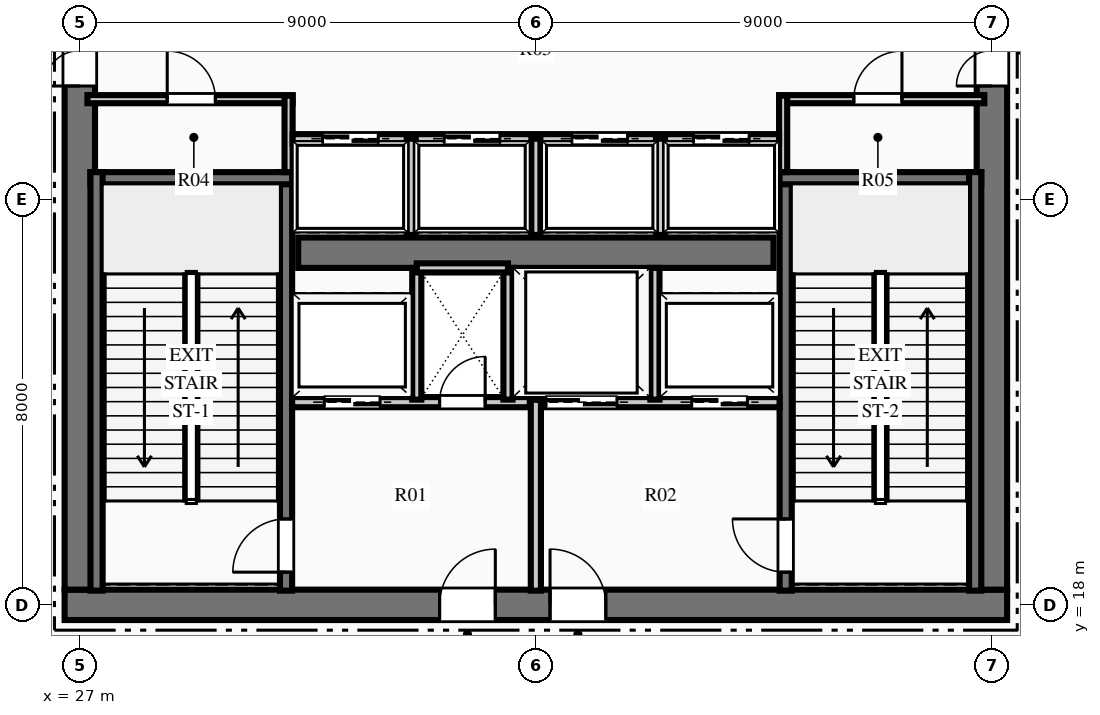
"""IFC4 building model, lengths in metres.
Left out: names, types, materials, properties, quantities, classifications, styles, units other than length and angle.
Written with IfcOpenShell. Run it as: python <this file> out.ifc"""

import sys

from ifc_helpers import new_model, si_unit, direction, frame, frame_2d, origin, place, context, subcontext, project, spatial, rectangle, extrude, element, fill, save


model = new_model("IFC4")
c1 = context("Model", 3, precision=1e-05, world=origin(), true_north=direction((0.0, 1.0)))
c2 = subcontext(c1, "Body", "Model", "MODEL_VIEW")
j1 = project(units=[si_unit("LENGTHUNIT", "METRE"), si_unit("PLANEANGLEUNIT", "RADIAN")], contexts=[c1])
p1 = place(None, origin())
s1 = spatial("IfcSite", under=j1, at=p1, CompositionType="ELEMENT")
p2 = place(p1, origin())
s2 = spatial("IfcBuilding", under=s1, at=p2, CompositionType="ELEMENT")
p3 = place(p2, frame((0.0, 0.0, 22.2)))
s3 = spatial("IfcBuildingStorey", under=s2, at=p3, CompositionType="ELEMENT", Elevation=22.2)
p4 = place(p3, frame((26.7, 18.0, 0.0), z_axis=(0.0, 0.0, 1.0), x_axis=(1.0, 0.0, 0.0)))
e1 = element("IfcWall", 1, at=p4, inside=s3, PredefinedType="SHEAR", context=c2, shape_type="SweptSolid", body=[
    extrude(rectangle(XDim=18.6, YDim=0.6, at=frame_2d((9.3, 0.0))), origin(), (0.0, 0.0, 1.0), 6.0),
])
p5 = place(p4, frame((7.4, 0.0, 0.0)))
e2 = element("IfcOpeningElement", 2, at=p5, cuts=e1, PredefinedType="OPENING", context=c2, shape_type="SweptSolid", body=[
    extrude(rectangle(XDim=1.1, YDim=2.15, at=frame_2d((0.55, 1.075))), frame((0.0, 0.31, 0.0), z_axis=(0.0, -1.0, 0.0), x_axis=(1.0, 0.0, 0.0)), (0.0, 0.0, 1.0), 0.62),
])
p6 = place(p4, frame((9.58, 0.0, 0.0)))
e3 = element("IfcOpeningElement", 3, at=p6, cuts=e1, PredefinedType="OPENING", context=c2, shape_type="SweptSolid", body=[
    extrude(rectangle(XDim=1.1, YDim=2.15, at=frame_2d((0.55, 1.075))), frame((0.0, 0.31, 0.0), z_axis=(0.0, -1.0, 0.0), x_axis=(1.0, 0.0, 0.0)), (0.0, 0.0, 1.0), 0.62),
])
p7 = place(p3, frame((27.0, 18.3, 0.0), z_axis=(0.0, 0.0, 1.0), x_axis=(0.0, 1.0, 0.0)))
e4 = element("IfcWall", 4, at=p7, inside=s3, PredefinedType="SHEAR", context=c2, shape_type="SweptSolid", body=[
    extrude(rectangle(XDim=15.4, YDim=0.6, at=frame_2d((7.7, 0.0))), origin(), (0.0, 0.0, 1.0), 6.0),
])
p8 = place(p7, frame((9.94, 0.0, 0.0)))
e5 = element("IfcOpeningElement", 5, at=p8, cuts=e4, PredefinedType="OPENING", context=c2, shape_type="SweptSolid", body=[
    extrude(rectangle(XDim=1.4, YDim=2.2, at=frame_2d((0.7, 1.1))), frame((0.0, 0.31, 0.0), z_axis=(0.0, -1.0, 0.0), x_axis=(1.0, 0.0, 0.0)), (0.0, 0.0, 1.0), 0.62),
])
p9 = place(p3, frame((45.0, 18.3, 0.0), z_axis=(0.0, 0.0, 1.0), x_axis=(0.0, 1.0, 0.0)))
e6 = element("IfcWall", 6, at=p9, inside=s3, PredefinedType="SHEAR", context=c2, shape_type="SweptSolid", body=[
    extrude(rectangle(XDim=15.4, YDim=0.6, at=frame_2d((7.7, 0.0))), origin(), (0.0, 0.0, 1.0), 6.0),
])
p10 = place(p9, frame((9.94, 0.0, 0.0)))
e7 = element("IfcOpeningElement", 7, at=p10, cuts=e6, PredefinedType="OPENING", context=c2, shape_type="SweptSolid", body=[
    extrude(rectangle(XDim=1.4, YDim=2.2, at=frame_2d((0.7, 1.1))), frame((0.0, 0.31, 0.0), z_axis=(0.0, -1.0, 0.0), x_axis=(1.0, 0.0, 0.0)), (0.0, 0.0, 1.0), 0.62),
])
p11 = place(p3, frame((31.31, 24.95, 0.0), z_axis=(0.0, 0.0, 1.0), x_axis=(1.0, 0.0, 0.0)))
e8 = element("IfcWall", 8, at=p11, inside=s3, PredefinedType="SHEAR", context=c2, shape_type="SweptSolid", body=[
    extrude(rectangle(XDim=9.38, YDim=0.6, at=frame_2d((4.69, 0.0))), origin(), (0.0, 0.0, 1.0), 6.0),
])
p12 = place(p3, frame((31.07, 18.28, 0.0), z_axis=(0.0, 0.0, 1.0), x_axis=(0.0, 1.0, 0.0)))
e9 = element("IfcWall", 9, at=p12, inside=s3, PredefinedType="SHEAR", context=c2, shape_type="SweptSolid", body=[
    extrude(rectangle(XDim=8.26, YDim=0.24, at=frame_2d((4.13, 0.0))), origin(), (0.0, 0.0, 1.0), 6.0),
])
p13 = place(p12, frame((0.365, 0.0, 0.0)))
e10 = element("IfcOpeningElement", 10, at=p13, cuts=e9, PredefinedType="OPENING", context=c2, shape_type="SweptSolid", body=[
    extrude(rectangle(XDim=1.05, YDim=2.15, at=frame_2d((0.525, 1.075))), frame((0.0, 0.13, 0.0), z_axis=(0.0, -1.0, 0.0), x_axis=(1.0, 0.0, 0.0)), (0.0, 0.0, 1.0), 0.26),
])
p14 = place(p3, frame((27.21, 26.42, 0.0), z_axis=(0.0, 0.0, 1.0), x_axis=(1.0, 0.0, 0.0)))
e11 = element("IfcWall", 11, at=p14, inside=s3, PredefinedType="SHEAR", context=c2, shape_type="SweptSolid", body=[
    extrude(rectangle(XDim=3.98, YDim=0.24, at=frame_2d((1.99, 0.0))), origin(), (0.0, 0.0, 1.0), 6.0),
])
p15 = place(p3, frame((27.33, 18.28, 0.0), z_axis=(0.0, 0.0, 1.0), x_axis=(0.0, 1.0, 0.0)))
e12 = element("IfcWall", 12, at=p15, inside=s3, PredefinedType="SHEAR", context=c2, shape_type="SweptSolid", body=[
    extrude(rectangle(XDim=8.26, YDim=0.24, at=frame_2d((4.13, 0.0))), origin(), (0.0, 0.0, 1.0), 6.0),
])
p16 = place(p3, frame((40.93, 18.28, 0.0), z_axis=(0.0, 0.0, 1.0), x_axis=(0.0, 1.0, 0.0)))
e13 = element("IfcWall", 13, at=p16, inside=s3, PredefinedType="SHEAR", context=c2, shape_type="SweptSolid", body=[
    extrude(rectangle(XDim=8.26, YDim=0.24, at=frame_2d((4.13, 0.0))), origin(), (0.0, 0.0, 1.0), 6.0),
])
p17 = place(p16, frame((0.365, 0.0, 0.0)))
e14 = element("IfcOpeningElement", 14, at=p17, cuts=e13, PredefinedType="OPENING", context=c2, shape_type="SweptSolid", body=[
    extrude(rectangle(XDim=1.05, YDim=2.15, at=frame_2d((0.525, 1.075))), frame((0.0, 0.13, 0.0), z_axis=(0.0, -1.0, 0.0), x_axis=(1.0, 0.0, 0.0)), (0.0, 0.0, 1.0), 0.26),
])
p18 = place(p3, frame((40.81, 26.42, 0.0), z_axis=(0.0, 0.0, 1.0), x_axis=(1.0, 0.0, 0.0)))
e15 = element("IfcWall", 15, at=p18, inside=s3, PredefinedType="SHEAR", context=c2, shape_type="SweptSolid", body=[
    extrude(rectangle(XDim=3.98, YDim=0.24, at=frame_2d((1.99, 0.0))), origin(), (0.0, 0.0, 1.0), 6.0),
])
p19 = place(p3, frame((44.67, 18.28, 0.0), z_axis=(0.0, 0.0, 1.0), x_axis=(0.0, 1.0, 0.0)))
e16 = element("IfcWall", 16, at=p19, inside=s3, PredefinedType="SHEAR", context=c2, shape_type="SweptSolid", body=[
    extrude(rectangle(XDim=8.26, YDim=0.24, at=frame_2d((4.13, 0.0))), origin(), (0.0, 0.0, 1.0), 6.0),
])
p20 = place(p3, frame((36.0, 18.28, 0.0), z_axis=(0.0, 0.0, 1.0), x_axis=(0.0, 1.0, 0.0)))
e17 = element("IfcWall", 17, at=p20, inside=s3, PredefinedType="PARTITIONING", context=c2, shape_type="SweptSolid", body=[
    extrude(rectangle(XDim=3.77, YDim=0.2, at=frame_2d((1.885, 0.0))), origin(), (0.0, 0.0, 1.0), 5.59),
])
p21 = place(p3, frame((31.19, 22.0, 0.0), z_axis=(0.0, 0.0, 1.0), x_axis=(1.0, 0.0, 0.0)))
e18 = element("IfcWall", 18, at=p21, inside=s3, PredefinedType="PARTITIONING", context=c2, shape_type="SweptSolid", body=[
    extrude(rectangle(XDim=4.69, YDim=0.2, at=frame_2d((2.345, 0.0))), origin(), (0.0, 0.0, 1.0), 5.59),
])
p22 = place(p21, frame((2.91, 0.0, 0.0)))
e19 = element("IfcOpeningElement", 19, at=p22, cuts=e18, PredefinedType="OPENING", context=c2, shape_type="SweptSolid", body=[
    extrude(rectangle(XDim=0.9, YDim=2.15, at=frame_2d((0.45, 1.075))), frame((0.0, 0.11, 0.0), z_axis=(0.0, -1.0, 0.0), x_axis=(1.0, 0.0, 0.0)), (0.0, 0.0, 1.0), 0.22),
])
p23 = place(p21, frame((0.635, 0.0, 0.0)))
e20 = element("IfcOpeningElement", 20, at=p23, cuts=e18, PredefinedType="OPENING", context=c2, shape_type="SweptSolid", body=[
    extrude(rectangle(XDim=1.1, YDim=2.15, at=frame_2d((0.55, 1.075))), frame((0.0, 0.11, 0.0), z_axis=(0.0, -1.0, 0.0), x_axis=(1.0, 0.0, 0.0)), (0.0, 0.0, 1.0), 0.22),
])
p24 = place(p3, frame((36.12, 22.0, 0.0), z_axis=(0.0, 0.0, 1.0), x_axis=(1.0, 0.0, 0.0)))
e21 = element("IfcWall", 21, at=p24, inside=s3, PredefinedType="PARTITIONING", context=c2, shape_type="SweptSolid", body=[
    extrude(rectangle(XDim=4.69, YDim=0.2, at=frame_2d((2.345, 0.0))), origin(), (0.0, 0.0, 1.0), 5.59),
])
p25 = place(p24, frame((2.955, 0.0, 0.0)))
e22 = element("IfcOpeningElement", 22, at=p25, cuts=e21, PredefinedType="OPENING", context=c2, shape_type="SweptSolid", body=[
    extrude(rectangle(XDim=1.1, YDim=2.15, at=frame_2d((0.55, 1.075))), frame((0.0, 0.11, 0.0), z_axis=(0.0, -1.0, 0.0), x_axis=(1.0, 0.0, 0.0)), (0.0, 0.0, 1.0), 0.22),
])
p26 = place(p24, frame((0.08, 0.0, 0.0)))
e23 = element("IfcOpeningElement", 23, at=p26, cuts=e21, PredefinedType="OPENING", context=c2, shape_type="SweptSolid", body=[
    extrude(rectangle(XDim=1.4, YDim=2.2, at=frame_2d((0.7, 1.1))), frame((0.0, 0.11, 0.0), z_axis=(0.0, -1.0, 0.0), x_axis=(1.0, 0.0, 0.0)), (0.0, 0.0, 1.0), 0.22),
])
for number, where, z_axis, x_axis in (
    (24, (33.65, 22.05, 0.0), (0.0, 0.0, 1.0), (0.0, 1.0, 0.0)),
    (25, (35.45, 22.05, 0.0), (0.0, 0.0, 1.0), (0.0, 1.0, 0.0)),
):
    element("IfcWall", number, at=place(p3, frame(where, z_axis=z_axis, x_axis=x_axis)), inside=s3, PredefinedType="PARTITIONING", context=c2, shape_type="SweptSolid", body=[
        extrude(rectangle(XDim=2.6, YDim=0.18, at=frame_2d((1.3, 0.0))), origin(), (0.0, 0.0, 1.0), 5.59),
    ])
p27 = place(p3, frame((33.65, 24.65, 0.0), z_axis=(0.0, 0.0, 1.0), x_axis=(1.0, 0.0, 0.0)))
e26 = element("IfcWall", 26, at=p27, inside=s3, PredefinedType="PARTITIONING", context=c2, shape_type="SweptSolid", body=[
    extrude(rectangle(XDim=1.8, YDim=0.18, at=frame_2d((0.9, 0.0))), origin(), (0.0, 0.0, 1.0), 5.59),
])
p28 = place(p3, frame((38.35, 22.05, 0.0), z_axis=(0.0, 0.0, 1.0), x_axis=(0.0, 1.0, 0.0)))
e27 = element("IfcWall", 27, at=p28, inside=s3, PredefinedType="PARTITIONING", context=c2, shape_type="SweptSolid", body=[
    extrude(rectangle(XDim=2.6, YDim=0.18, at=frame_2d((1.3, 0.0))), origin(), (0.0, 0.0, 1.0), 5.59),
])
p29 = place(p3, frame((27.15, 27.98, 0.0), z_axis=(0.0, 0.0, 1.0), x_axis=(1.0, 0.0, 0.0)))
e28 = element("IfcWall", 28, at=p29, inside=s3, PredefinedType="PARTITIONING", context=c2, shape_type="SweptSolid", body=[
    extrude(rectangle(XDim=4.05, YDim=0.16, at=frame_2d((2.025, 0.0))), origin(), (0.0, 0.0, 1.0), 5.59),
])
p30 = place(p29, frame((1.575, 0.0, 0.0)))
e29 = element("IfcOpeningElement", 29, at=p30, cuts=e28, PredefinedType="OPENING", context=c2, shape_type="SweptSolid", body=[
    extrude(rectangle(XDim=0.95, YDim=2.15, at=frame_2d((0.475, 1.075))), frame((0.0, 0.09, 0.0), z_axis=(0.0, -1.0, 0.0), x_axis=(1.0, 0.0, 0.0)), (0.0, 0.0, 1.0), 0.18),
])
p31 = place(p3, frame((31.12, 26.54, 0.0), z_axis=(0.0, 0.0, 1.0), x_axis=(0.0, 1.0, 0.0)))
e30 = element("IfcWall", 30, at=p31, inside=s3, PredefinedType="PARTITIONING", context=c2, shape_type="SweptSolid", body=[
    extrude(rectangle(XDim=1.51, YDim=0.16, at=frame_2d((0.755, 0.0))), origin(), (0.0, 0.0, 1.0), 5.59),
])
p32 = place(p3, frame((40.8, 27.98, 0.0), z_axis=(0.0, 0.0, 1.0), x_axis=(1.0, 0.0, 0.0)))
e31 = element("IfcWall", 31, at=p32, inside=s3, PredefinedType="PARTITIONING", context=c2, shape_type="SweptSolid", body=[
    extrude(rectangle(XDim=4.05, YDim=0.16, at=frame_2d((2.025, 0.0))), origin(), (0.0, 0.0, 1.0), 5.59),
])
p33 = place(p32, frame((1.475, 0.0, 0.0)))
e32 = element("IfcOpeningElement", 32, at=p33, cuts=e31, PredefinedType="OPENING", context=c2, shape_type="SweptSolid", body=[
    extrude(rectangle(XDim=0.95, YDim=2.15, at=frame_2d((0.475, 1.075))), frame((0.0, 0.09, 0.0), z_axis=(0.0, -1.0, 0.0), x_axis=(1.0, 0.0, 0.0)), (0.0, 0.0, 1.0), 0.18),
])
p34 = place(p3, frame((40.88, 26.54, 0.0), z_axis=(0.0, 0.0, 1.0), x_axis=(0.0, 1.0, 0.0)))
e33 = element("IfcWall", 33, at=p34, inside=s3, PredefinedType="PARTITIONING", context=c2, shape_type="SweptSolid", body=[
    extrude(rectangle(XDim=1.51, YDim=0.16, at=frame_2d((0.755, 0.0))), origin(), (0.0, 0.0, 1.0), 5.59),
])
p35 = place(p3, frame((31.2, 27.2, 0.0), z_axis=(0.0, 0.0, 1.0), x_axis=(1.0, 0.0, 0.0)))
e34 = element("IfcWall", 34, at=p35, inside=s3, PredefinedType="PARTITIONING", context=c2, shape_type="SweptSolid", body=[
    extrude(rectangle(XDim=9.6, YDim=0.18, at=frame_2d((4.8, 0.0))), origin(), (0.0, 0.0, 1.0), 5.59),
])
p36 = place(p35, frame((0.59, 0.0, 0.0)))
e35 = element("IfcOpeningElement", 35, at=p36, cuts=e34, PredefinedType="OPENING", context=c2, shape_type="SweptSolid", body=[
    extrude(rectangle(XDim=1.1, YDim=2.15, at=frame_2d((0.55, 1.075))), frame((0.0, 0.1, 0.0), z_axis=(0.0, -1.0, 0.0), x_axis=(1.0, 0.0, 0.0)), (0.0, 0.0, 1.0), 0.2),
])
p37 = place(p35, frame((2.99, 0.0, 0.0)))
e36 = element("IfcOpeningElement", 36, at=p37, cuts=e34, PredefinedType="OPENING", context=c2, shape_type="SweptSolid", body=[
    extrude(rectangle(XDim=1.1, YDim=2.15, at=frame_2d((0.55, 1.075))), frame((0.0, 0.1, 0.0), z_axis=(0.0, -1.0, 0.0), x_axis=(1.0, 0.0, 0.0)), (0.0, 0.0, 1.0), 0.2),
])
p38 = place(p35, frame((5.51, 0.0, 0.0)))
e37 = element("IfcOpeningElement", 37, at=p38, cuts=e34, PredefinedType="OPENING", context=c2, shape_type="SweptSolid", body=[
    extrude(rectangle(XDim=1.1, YDim=2.15, at=frame_2d((0.55, 1.075))), frame((0.0, 0.1, 0.0), z_axis=(0.0, -1.0, 0.0), x_axis=(1.0, 0.0, 0.0)), (0.0, 0.0, 1.0), 0.2),
])
p39 = place(p35, frame((7.91, 0.0, 0.0)))
e38 = element("IfcOpeningElement", 38, at=p39, cuts=e34, PredefinedType="OPENING", context=c2, shape_type="SweptSolid", body=[
    extrude(rectangle(XDim=1.1, YDim=2.15, at=frame_2d((0.55, 1.075))), frame((0.0, 0.1, 0.0), z_axis=(0.0, -1.0, 0.0), x_axis=(1.0, 0.0, 0.0)), (0.0, 0.0, 1.0), 0.2),
])
for number, where, z_axis, x_axis in (
    (39, (33.54, 25.3, 0.0), (0.0, 0.0, 1.0), (0.0, 1.0, 0.0)),
    (40, (36.0, 25.3, 0.0), (0.0, 0.0, 1.0), (0.0, 1.0, 0.0)),
    (41, (38.46, 25.3, 0.0), (0.0, 0.0, 1.0), (0.0, 1.0, 0.0)),
):
    element("IfcWall", number, at=place(p3, frame(where, z_axis=z_axis, x_axis=x_axis)), inside=s3, PredefinedType="PARTITIONING", context=c2, shape_type="SweptSolid", body=[
        extrude(rectangle(XDim=1.9, YDim=0.18, at=frame_2d((0.95, 0.0))), origin(), (0.0, 0.0, 1.0), 5.59),
    ])
p40 = place(p30, origin())
e42 = element("IfcDoor", 42, at=p40, inside=s3, OperationType="SINGLE_SWING_LEFT", PredefinedType="DOOR", context=c2, shape_type="SweptSolid", body=[
    extrude(rectangle(XDim=0.95, YDim=2.15, at=frame_2d((0.475, 1.075))), frame((0.0, 0.025, 0.0), z_axis=(0.0, -1.0, 0.0), x_axis=(1.0, 0.0, 0.0)), (0.0, 0.0, 1.0), 0.05),
])
fill(e29, e42)
p41 = place(p33, origin())
e43 = element("IfcDoor", 43, at=p41, inside=s3, OperationType="SINGLE_SWING_RIGHT", PredefinedType="DOOR", context=c2, shape_type="SweptSolid", body=[
    extrude(rectangle(XDim=0.95, YDim=2.15, at=frame_2d((0.475, 1.075))), frame((0.0, 0.025, 0.0), z_axis=(0.0, -1.0, 0.0), x_axis=(1.0, 0.0, 0.0)), (0.0, 0.0, 1.0), 0.05),
])
fill(e32, e43)
p42 = place(p13, origin())
e44 = element("IfcDoor", 44, at=p42, inside=s3, OperationType="SINGLE_SWING_LEFT", PredefinedType="DOOR", context=c2, shape_type="SweptSolid", body=[
    extrude(rectangle(XDim=1.05, YDim=2.15, at=frame_2d((0.525, 1.075))), frame((0.0, 0.025, 0.0), z_axis=(0.0, -1.0, 0.0), x_axis=(1.0, 0.0, 0.0)), (0.0, 0.0, 1.0), 0.05),
])
fill(e10, e44)
p43 = place(p17, origin())
e45 = element("IfcDoor", 45, at=p43, inside=s3, OperationType="SINGLE_SWING_RIGHT", PredefinedType="DOOR", context=c2, shape_type="SweptSolid", body=[
    extrude(rectangle(XDim=1.05, YDim=2.15, at=frame_2d((0.525, 1.075))), frame((0.0, 0.025, 0.0), z_axis=(0.0, -1.0, 0.0), x_axis=(1.0, 0.0, 0.0)), (0.0, 0.0, 1.0), 0.05),
])
fill(e14, e45)
p44 = place(p5, origin())
e46 = element("IfcDoor", 46, at=p44, inside=s3, OperationType="SINGLE_SWING_RIGHT", PredefinedType="DOOR", context=c2, shape_type="SweptSolid", body=[
    extrude(rectangle(XDim=1.1, YDim=2.15, at=frame_2d((0.55, 1.075))), frame((0.0, 0.025, 0.0), z_axis=(0.0, -1.0, 0.0), x_axis=(1.0, 0.0, 0.0)), (0.0, 0.0, 1.0), 0.05),
])
fill(e2, e46)
p45 = place(p6, origin())
e47 = element("IfcDoor", 47, at=p45, inside=s3, OperationType="SINGLE_SWING_LEFT", PredefinedType="DOOR", context=c2, shape_type="SweptSolid", body=[
    extrude(rectangle(XDim=1.1, YDim=2.15, at=frame_2d((0.55, 1.075))), frame((0.0, 0.025, 0.0), z_axis=(0.0, -1.0, 0.0), x_axis=(1.0, 0.0, 0.0)), (0.0, 0.0, 1.0), 0.05),
])
fill(e3, e47)
p46 = place(p22, origin())
e48 = element("IfcDoor", 48, at=p46, inside=s3, OperationType="SINGLE_SWING_RIGHT", PredefinedType="DOOR", context=c2, shape_type="SweptSolid", body=[
    extrude(rectangle(XDim=0.9, YDim=2.15, at=frame_2d((0.45, 1.075))), frame((0.0, 0.025, 0.0), z_axis=(0.0, -1.0, 0.0), x_axis=(1.0, 0.0, 0.0)), (0.0, 0.0, 1.0), 0.05),
])
fill(e19, e48)
p47 = place(p8, origin())
e49 = element("IfcDoor", 49, at=p47, inside=s3, OperationType="DOUBLE_DOOR_SINGLE_SWING", PredefinedType="DOOR", context=c2, shape_type="SweptSolid", body=[
    extrude(rectangle(XDim=1.4, YDim=2.2, at=frame_2d((0.7, 1.1))), frame((0.0, 0.025, 0.0), z_axis=(0.0, -1.0, 0.0), x_axis=(1.0, 0.0, 0.0)), (0.0, 0.0, 1.0), 0.05),
])
fill(e5, e49)
p48 = place(p10, origin())
e50 = element("IfcDoor", 50, at=p48, inside=s3, OperationType="DOUBLE_DOOR_SINGLE_SWING", PredefinedType="DOOR", context=c2, shape_type="SweptSolid", body=[
    extrude(rectangle(XDim=1.4, YDim=2.2, at=frame_2d((0.7, 1.1))), frame((0.0, 0.025, 0.0), z_axis=(0.0, -1.0, 0.0), x_axis=(1.0, 0.0, 0.0)), (0.0, 0.0, 1.0), 0.05),
])
fill(e7, e50)
p49 = place(p36, origin())
e51 = element("IfcDoor", 51, at=p49, inside=s3, OperationType="SLIDING_TO_LEFT", PredefinedType="DOOR", context=c2, shape_type="SweptSolid", body=[
    extrude(rectangle(XDim=1.1, YDim=2.15, at=frame_2d((0.55, 1.075))), frame((0.0, 0.025, 0.0), z_axis=(0.0, -1.0, 0.0), x_axis=(1.0, 0.0, 0.0)), (0.0, 0.0, 1.0), 0.05),
])
fill(e35, e51)
p50 = place(p37, origin())
e52 = element("IfcDoor", 52, at=p50, inside=s3, OperationType="SLIDING_TO_LEFT", PredefinedType="DOOR", context=c2, shape_type="SweptSolid", body=[
    extrude(rectangle(XDim=1.1, YDim=2.15, at=frame_2d((0.55, 1.075))), frame((0.0, 0.025, 0.0), z_axis=(0.0, -1.0, 0.0), x_axis=(1.0, 0.0, 0.0)), (0.0, 0.0, 1.0), 0.05),
])
fill(e36, e52)
p51 = place(p38, origin())
e53 = element("IfcDoor", 53, at=p51, inside=s3, OperationType="SLIDING_TO_LEFT", PredefinedType="DOOR", context=c2, shape_type="SweptSolid", body=[
    extrude(rectangle(XDim=1.1, YDim=2.15, at=frame_2d((0.55, 1.075))), frame((0.0, 0.025, 0.0), z_axis=(0.0, -1.0, 0.0), x_axis=(1.0, 0.0, 0.0)), (0.0, 0.0, 1.0), 0.05),
])
fill(e37, e53)
p52 = place(p39, origin())
e54 = element("IfcDoor", 54, at=p52, inside=s3, OperationType="SLIDING_TO_LEFT", PredefinedType="DOOR", context=c2, shape_type="SweptSolid", body=[
    extrude(rectangle(XDim=1.1, YDim=2.15, at=frame_2d((0.55, 1.075))), frame((0.0, 0.025, 0.0), z_axis=(0.0, -1.0, 0.0), x_axis=(1.0, 0.0, 0.0)), (0.0, 0.0, 1.0), 0.05),
])
fill(e38, e54)
p53 = place(p23, origin())
e55 = element("IfcDoor", 55, at=p53, inside=s3, OperationType="SLIDING_TO_LEFT", PredefinedType="DOOR", context=c2, shape_type="SweptSolid", body=[
    extrude(rectangle(XDim=1.1, YDim=2.15, at=frame_2d((0.55, 1.075))), frame((0.0, 0.025, 0.0), z_axis=(0.0, -1.0, 0.0), x_axis=(1.0, 0.0, 0.0)), (0.0, 0.0, 1.0), 0.05),
])
fill(e20, e55)
p54 = place(p25, origin())
e56 = element("IfcDoor", 56, at=p54, inside=s3, OperationType="SLIDING_TO_LEFT", PredefinedType="DOOR", context=c2, shape_type="SweptSolid", body=[
    extrude(rectangle(XDim=1.1, YDim=2.15, at=frame_2d((0.55, 1.075))), frame((0.0, 0.025, 0.0), z_axis=(0.0, -1.0, 0.0), x_axis=(1.0, 0.0, 0.0)), (0.0, 0.0, 1.0), 0.05),
])
fill(e22, e56)
p55 = place(p26, origin())
e57 = element("IfcDoor", 57, at=p55, inside=s3, OperationType="SLIDING_TO_LEFT", PredefinedType="DOOR", context=c2, shape_type="SweptSolid", body=[
    extrude(rectangle(XDim=1.4, YDim=2.2, at=frame_2d((0.7, 1.1))), frame((0.0, 0.025, 0.0), z_axis=(0.0, -1.0, 0.0), x_axis=(1.0, 0.0, 0.0)), (0.0, 0.0, 1.0), 0.05),
])
fill(e23, e57)
save(model, sys.argv[1])
